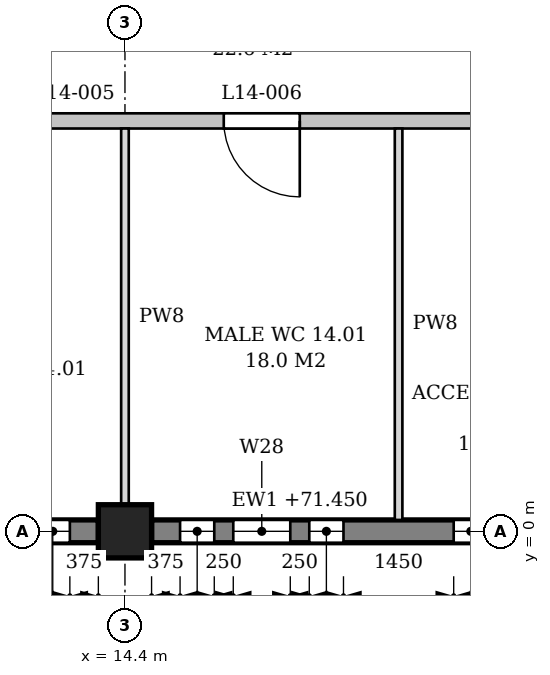
"""IFC4 building model, lengths in metres.
Left out: names, types, materials, properties, quantities, classifications, styles, units other than length and angle.
Written with IfcOpenShell. Run it as: python <this file> out.ifc"""

import sys

from ifc_helpers import new_model, si_unit, direction, frame, frame_2d, origin, origin_2d, place, context, subcontext, project, spatial, polyline, rectangle, outline, extrude, element, fill, save


model = new_model("IFC4")
c1 = context("Model", 3, precision=1e-05, world=origin(), true_north=direction((0.0, 1.0)))
c2 = subcontext(c1, "Body", "Model", "MODEL_VIEW")
j1 = project(units=[si_unit("LENGTHUNIT", "METRE"), si_unit("PLANEANGLEUNIT", "RADIAN")], contexts=[c1])
p1 = place(None, origin())
s1 = spatial("IfcSite", under=j1, at=p1, CompositionType="ELEMENT")
p2 = place(p1, origin())
s2 = spatial("IfcBuilding", under=s1, at=p2, CompositionType="ELEMENT")
p3 = place(p2, frame((0.0, 0.0, 67.8)))
s3 = spatial("IfcBuildingStorey", under=s2, at=p3, CompositionType="ELEMENT", Elevation=67.8)
p4 = place(p3, frame((14.4, 0.0, 0.0), z_axis=(0.0, 0.0, 1.0), x_axis=(1.0, 0.0, 0.0)))
e1 = element("IfcColumn", 1, at=p4, inside=s3, PredefinedType="COLUMN", context=c2, shape_type="SweptSolid", body=[
    extrude(rectangle(XDim=0.7, YDim=0.7, at=origin_2d()), origin(), (0.0, 0.0, 1.0), 4.5),
])
p5 = place(p3, frame((7.55, 0.0, 0.0), z_axis=(0.0, 0.0, 1.0), x_axis=(1.0, 0.0, 0.0)))
e2 = element("IfcWall", 2, at=p5, inside=s3, PredefinedType="STANDARD", context=c2, shape_type="SweptSolid", body=[
    extrude(rectangle(XDim=6.5, YDim=0.3, at=frame_2d((3.25, 0.0))), origin(), (0.0, 0.0, 1.0), 3.65),
])
p6 = place(p5, frame((0.375, 0.0, 1.5)))
e3 = element("IfcOpeningElement", 3, at=p6, cuts=e2, PredefinedType="OPENING", context=c2, shape_type="SweptSolid", body=[
    extrude(outline(polyline([(0.0, 0.0), (0.45, 0.0), (0.45, 1.85), (0.225, 2.1), (0.0, 1.85), (0.0, 0.0)])), frame((0.0, 0.16, 0.0), z_axis=(0.0, -1.0, 0.0), x_axis=(1.0, 0.0, 0.0)), (0.0, 0.0, 1.0), 0.32),
])
p7 = place(p5, frame((1.075, 0.0, 0.9)))
e4 = element("IfcOpeningElement", 4, at=p7, cuts=e2, PredefinedType="OPENING", context=c2, shape_type="SweptSolid", body=[
    extrude(outline(polyline([(0.0, 0.0), (0.75, 0.0), (0.75, 2.25), (0.375, 2.7), (0.0, 2.25), (0.0, 0.0)])), frame((0.0, 0.16, 0.0), z_axis=(0.0, -1.0, 0.0), x_axis=(1.0, 0.0, 0.0)), (0.0, 0.0, 1.0), 0.32),
])
p8 = place(p5, frame((2.075, 0.0, 1.5)))
e5 = element("IfcOpeningElement", 5, at=p8, cuts=e2, PredefinedType="OPENING", context=c2, shape_type="SweptSolid", body=[
    extrude(outline(polyline([(0.0, 0.0), (0.45, 0.0), (0.45, 1.85), (0.225, 2.1), (0.0, 1.85), (0.0, 0.0)])), frame((0.0, 0.16, 0.0), z_axis=(0.0, -1.0, 0.0), x_axis=(1.0, 0.0, 0.0)), (0.0, 0.0, 1.0), 0.32),
])
p9 = place(p5, frame((3.975, 0.0, 1.5)))
e6 = element("IfcOpeningElement", 6, at=p9, cuts=e2, PredefinedType="OPENING", context=c2, shape_type="SweptSolid", body=[
    extrude(outline(polyline([(0.0, 0.0), (0.45, 0.0), (0.45, 1.85), (0.225, 2.1), (0.0, 1.85), (0.0, 0.0)])), frame((0.0, 0.16, 0.0), z_axis=(0.0, -1.0, 0.0), x_axis=(1.0, 0.0, 0.0)), (0.0, 0.0, 1.0), 0.32),
])
p10 = place(p5, frame((4.675, 0.0, 0.9)))
e7 = element("IfcOpeningElement", 7, at=p10, cuts=e2, PredefinedType="OPENING", context=c2, shape_type="SweptSolid", body=[
    extrude(outline(polyline([(0.0, 0.0), (0.75, 0.0), (0.75, 2.25), (0.375, 2.7), (0.0, 2.25), (0.0, 0.0)])), frame((0.0, 0.16, 0.0), z_axis=(0.0, -1.0, 0.0), x_axis=(1.0, 0.0, 0.0)), (0.0, 0.0, 1.0), 0.32),
])
p11 = place(p5, frame((5.675, 0.0, 1.5)))
e8 = element("IfcOpeningElement", 8, at=p11, cuts=e2, PredefinedType="OPENING", context=c2, shape_type="SweptSolid", body=[
    extrude(outline(polyline([(0.0, 0.0), (0.45, 0.0), (0.45, 1.85), (0.225, 2.1), (0.0, 1.85), (0.0, 0.0)])), frame((0.0, 0.16, 0.0), z_axis=(0.0, -1.0, 0.0), x_axis=(1.0, 0.0, 0.0)), (0.0, 0.0, 1.0), 0.32),
])
p12 = place(p3, frame((14.75, 0.0, 0.0), z_axis=(0.0, 0.0, 1.0), x_axis=(1.0, 0.0, 0.0)))
e9 = element("IfcWall", 9, at=p12, inside=s3, PredefinedType="STANDARD", context=c2, shape_type="SweptSolid", body=[
    extrude(rectangle(XDim=6.5, YDim=0.3, at=frame_2d((3.25, 0.0))), origin(), (0.0, 0.0, 1.0), 3.65),
])
p13 = place(p12, frame((0.375, 0.0, 1.5)))
e10 = element("IfcOpeningElement", 10, at=p13, cuts=e9, PredefinedType="OPENING", context=c2, shape_type="SweptSolid", body=[
    extrude(outline(polyline([(0.0, 0.0), (0.45, 0.0), (0.45, 1.85), (0.225, 2.1), (0.0, 1.85), (0.0, 0.0)])), frame((0.0, 0.16, 0.0), z_axis=(0.0, -1.0, 0.0), x_axis=(1.0, 0.0, 0.0)), (0.0, 0.0, 1.0), 0.32),
])
p14 = place(p12, frame((1.075, 0.0, 0.9)))
e11 = element("IfcOpeningElement", 11, at=p14, cuts=e9, PredefinedType="OPENING", context=c2, shape_type="SweptSolid", body=[
    extrude(outline(polyline([(0.0, 0.0), (0.75, 0.0), (0.75, 2.25), (0.375, 2.7), (0.0, 2.25), (0.0, 0.0)])), frame((0.0, 0.16, 0.0), z_axis=(0.0, -1.0, 0.0), x_axis=(1.0, 0.0, 0.0)), (0.0, 0.0, 1.0), 0.32),
])
p15 = place(p12, frame((2.075, 0.0, 1.5)))
e12 = element("IfcOpeningElement", 12, at=p15, cuts=e9, PredefinedType="OPENING", context=c2, shape_type="SweptSolid", body=[
    extrude(outline(polyline([(0.0, 0.0), (0.45, 0.0), (0.45, 1.85), (0.225, 2.1), (0.0, 1.85), (0.0, 0.0)])), frame((0.0, 0.16, 0.0), z_axis=(0.0, -1.0, 0.0), x_axis=(1.0, 0.0, 0.0)), (0.0, 0.0, 1.0), 0.32),
])
p16 = place(p12, frame((3.975, 0.0, 1.5)))
e13 = element("IfcOpeningElement", 13, at=p16, cuts=e9, PredefinedType="OPENING", context=c2, shape_type="SweptSolid", body=[
    extrude(outline(polyline([(0.0, 0.0), (0.45, 0.0), (0.45, 1.85), (0.225, 2.1), (0.0, 1.85), (0.0, 0.0)])), frame((0.0, 0.16, 0.0), z_axis=(0.0, -1.0, 0.0), x_axis=(1.0, 0.0, 0.0)), (0.0, 0.0, 1.0), 0.32),
])
p17 = place(p12, frame((4.675, 0.0, 0.9)))
e14 = element("IfcOpeningElement", 14, at=p17, cuts=e9, PredefinedType="OPENING", context=c2, shape_type="SweptSolid", body=[
    extrude(outline(polyline([(0.0, 0.0), (0.75, 0.0), (0.75, 2.25), (0.375, 2.7), (0.0, 2.25), (0.0, 0.0)])), frame((0.0, 0.16, 0.0), z_axis=(0.0, -1.0, 0.0), x_axis=(1.0, 0.0, 0.0)), (0.0, 0.0, 1.0), 0.32),
])
p18 = place(p12, frame((5.675, 0.0, 1.5)))
e15 = element("IfcOpeningElement", 15, at=p18, cuts=e9, PredefinedType="OPENING", context=c2, shape_type="SweptSolid", body=[
    extrude(outline(polyline([(0.0, 0.0), (0.45, 0.0), (0.45, 1.85), (0.225, 2.1), (0.0, 1.85), (0.0, 0.0)])), frame((0.0, 0.16, 0.0), z_axis=(0.0, -1.0, 0.0), x_axis=(1.0, 0.0, 0.0)), (0.0, 0.0, 1.0), 0.32),
])
p19 = place(p3, frame((7.325, 5.4, 0.0), z_axis=(0.0, 0.0, 1.0), x_axis=(1.0, 0.0, 0.0)))
e16 = element("IfcWall", 16, at=p19, inside=s3, PredefinedType="PARTITIONING", context=c2, shape_type="SweptSolid", body=[
    extrude(outline(polyline([(0.0, 0.0), (14.15, 0.0), (14.15, 3.6), (14.075, 3.6), (14.075, 4.25), (7.275, 4.25), (7.275, 3.6), (6.875, 3.6), (6.875, 4.25), (0.075, 4.25), (0.075, 3.6), (0.0, 3.6), (0.0, 0.0)])), frame((0.0, 0.1, 0.0), z_axis=(0.0, -1.0, 0.0), x_axis=(1.0, 0.0, 0.0)), (0.0, 0.0, 1.0), 0.2),
])
p20 = place(p19, frame((1.238, 0.0, 0.0)))
e17 = element("IfcOpeningElement", 17, at=p20, cuts=e16, PredefinedType="OPENING", context=c2, shape_type="SweptSolid", body=[
    extrude(rectangle(XDim=1.0, YDim=2.1, at=frame_2d((0.5, 1.05))), frame((0.0, 0.11, 0.0), z_axis=(0.0, -1.0, 0.0), x_axis=(1.0, 0.0, 0.0)), (0.0, 0.0, 1.0), 0.22),
])
p21 = place(p19, frame((4.775, 0.0, 0.0)))
e18 = element("IfcOpeningElement", 18, at=p21, cuts=e16, PredefinedType="OPENING", context=c2, shape_type="SweptSolid", body=[
    extrude(rectangle(XDim=1.0, YDim=2.1, at=frame_2d((0.5, 1.05))), frame((0.0, 0.11, 0.0), z_axis=(0.0, -1.0, 0.0), x_axis=(1.0, 0.0, 0.0)), (0.0, 0.0, 1.0), 0.22),
])
p22 = place(p19, frame((8.375, 0.0, 0.0)))
e19 = element("IfcOpeningElement", 19, at=p22, cuts=e16, PredefinedType="OPENING", context=c2, shape_type="SweptSolid", body=[
    extrude(rectangle(XDim=1.0, YDim=2.1, at=frame_2d((0.5, 1.05))), frame((0.0, 0.11, 0.0), z_axis=(0.0, -1.0, 0.0), x_axis=(1.0, 0.0, 0.0)), (0.0, 0.0, 1.0), 0.22),
])
p23 = place(p19, frame((11.913, 0.0, 0.0)))
e20 = element("IfcOpeningElement", 20, at=p23, cuts=e16, PredefinedType="OPENING", context=c2, shape_type="SweptSolid", body=[
    extrude(rectangle(XDim=1.0, YDim=2.1, at=frame_2d((0.5, 1.05))), frame((0.0, 0.11, 0.0), z_axis=(0.0, -1.0, 0.0), x_axis=(1.0, 0.0, 0.0)), (0.0, 0.0, 1.0), 0.22),
])
p24 = place(p3, frame((14.4, 0.35, 0.0), z_axis=(0.0, 0.0, 1.0), x_axis=(0.0, 1.0, 0.0)))
e21 = element("IfcWall", 21, at=p24, inside=s3, PredefinedType="PARTITIONING", context=c2, shape_type="SweptSolid", body=[
    extrude(rectangle(XDim=4.95, YDim=0.1, at=frame_2d((2.475, 0.0))), origin(), (0.0, 0.0, 1.0), 3.6),
])
p25 = place(p3, frame((18.0, 0.15, 0.0), z_axis=(0.0, 0.0, 1.0), x_axis=(0.0, 1.0, 0.0)))
e22 = element("IfcWall", 22, at=p25, inside=s3, PredefinedType="PARTITIONING", context=c2, shape_type="SweptSolid", body=[
    extrude(rectangle(XDim=5.15, YDim=0.1, at=frame_2d((2.575, 0.0))), origin(), (0.0, 0.0, 1.0), 3.6),
])
p26 = place(p11, origin())
e23 = element("IfcWindow", 23, at=p26, inside=s3, PartitioningType="SINGLE_PANEL", PredefinedType="WINDOW", context=c2, shape_type="SweptSolid", body=[
    extrude(outline(polyline([(0.0, 0.0), (0.45, 0.0), (0.45, 1.85), (0.225, 2.1), (0.0, 1.85), (0.0, 0.0)])), frame((0.0, 0.03, 0.0), z_axis=(0.0, -1.0, 0.0), x_axis=(1.0, 0.0, 0.0)), (0.0, 0.0, 1.0), 0.06),
])
fill(e8, e23)
p27 = place(p13, origin())
e24 = element("IfcWindow", 24, at=p27, inside=s3, PartitioningType="SINGLE_PANEL", PredefinedType="WINDOW", context=c2, shape_type="SweptSolid", body=[
    extrude(outline(polyline([(0.0, 0.0), (0.45, 0.0), (0.45, 1.85), (0.225, 2.1), (0.0, 1.85), (0.0, 0.0)])), frame((0.0, 0.03, 0.0), z_axis=(0.0, -1.0, 0.0), x_axis=(1.0, 0.0, 0.0)), (0.0, 0.0, 1.0), 0.06),
])
fill(e10, e24)
p28 = place(p14, origin())
e25 = element("IfcWindow", 25, at=p28, inside=s3, PartitioningType="SINGLE_PANEL", PredefinedType="WINDOW", context=c2, shape_type="SweptSolid", body=[
    extrude(outline(polyline([(0.0, 0.0), (0.75, 0.0), (0.75, 2.25), (0.375, 2.7), (0.0, 2.25), (0.0, 0.0)])), frame((0.0, 0.03, 0.0), z_axis=(0.0, -1.0, 0.0), x_axis=(1.0, 0.0, 0.0)), (0.0, 0.0, 1.0), 0.06),
])
fill(e11, e25)
p29 = place(p15, origin())
e26 = element("IfcWindow", 26, at=p29, inside=s3, PartitioningType="SINGLE_PANEL", PredefinedType="WINDOW", context=c2, shape_type="SweptSolid", body=[
    extrude(outline(polyline([(0.0, 0.0), (0.45, 0.0), (0.45, 1.85), (0.225, 2.1), (0.0, 1.85), (0.0, 0.0)])), frame((0.0, 0.03, 0.0), z_axis=(0.0, -1.0, 0.0), x_axis=(1.0, 0.0, 0.0)), (0.0, 0.0, 1.0), 0.06),
])
fill(e12, e26)
p30 = place(p16, origin())
e27 = element("IfcWindow", 27, at=p30, inside=s3, PartitioningType="SINGLE_PANEL", PredefinedType="WINDOW", context=c2, shape_type="SweptSolid", body=[
    extrude(outline(polyline([(0.0, 0.0), (0.45, 0.0), (0.45, 1.85), (0.225, 2.1), (0.0, 1.85), (0.0, 0.0)])), frame((0.0, 0.03, 0.0), z_axis=(0.0, -1.0, 0.0), x_axis=(1.0, 0.0, 0.0)), (0.0, 0.0, 1.0), 0.06),
])
fill(e13, e27)
p31 = place(p22, frame((1.0, 0.0, 0.0), z_axis=(0.0, 0.0, 1.0), x_axis=(-1.0, 0.0, 0.0)))
e28 = element("IfcDoor", 28, at=p31, inside=s3, OperationType="SINGLE_SWING_LEFT", PredefinedType="DOOR", context=c2, shape_type="SweptSolid", body=[
    extrude(rectangle(XDim=1.0, YDim=2.1, at=frame_2d((0.5, 1.05))), frame((0.0, 0.025, 0.0), z_axis=(0.0, -1.0, 0.0), x_axis=(1.0, 0.0, 0.0)), (0.0, 0.0, 1.0), 0.05),
])
fill(e19, e28)
save(model, sys.argv[1])
